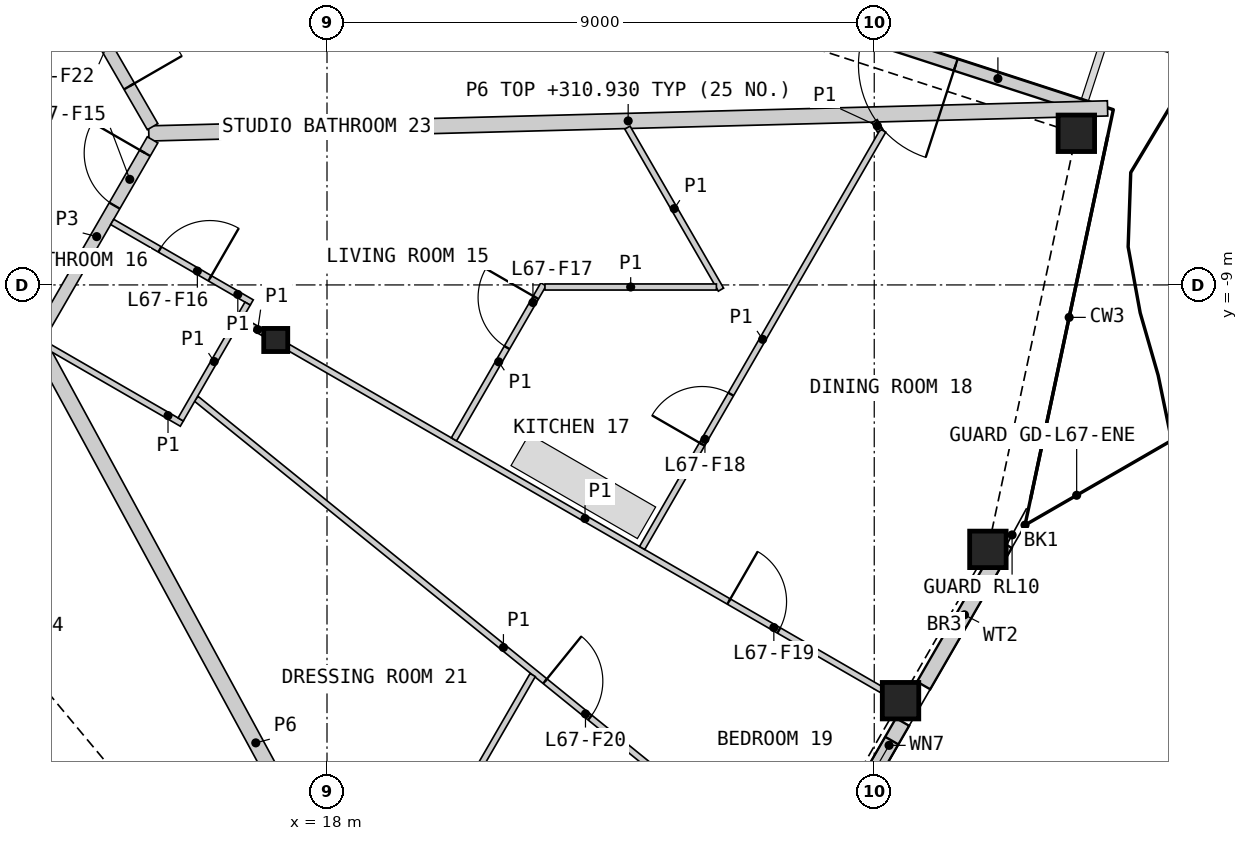
"""IFC4 building model, lengths in metres.
Left out: names, types, materials, properties, quantities, classifications, styles, units other than length and angle.
Written with IfcOpenShell. Run it as: python <this file> out.ifc"""

import sys

from ifc_helpers import new_model, si_unit, direction, frame, frame_2d, origin, origin_2d, place, context, subcontext, project, spatial, rectangle, hollow_rectangle, i_section, extrude, element, fill, save


model = new_model("IFC4")
c1 = context("Model", 3, precision=1e-05, world=origin(), true_north=direction((0.0, 1.0)))
c2 = subcontext(c1, "Body", "Model", "MODEL_VIEW")
j1 = project(units=[si_unit("LENGTHUNIT", "METRE"), si_unit("PLANEANGLEUNIT", "RADIAN")], contexts=[c1])
p1 = place(None, origin())
s1 = spatial("IfcSite", under=j1, at=p1, CompositionType="ELEMENT")
p2 = place(p1, origin())
s2 = spatial("IfcBuilding", under=s1, at=p2, CompositionType="ELEMENT")
p3 = place(p2, frame((0.0, 0.0, 308.6)))
s3 = spatial("IfcBuildingStorey", under=s2, at=p3, CompositionType="ELEMENT", Elevation=308.6)
for number, where, z_axis, x_axis in (
    (1, (27.432, -15.838, 0.0), (0.0, 0.0, 1.0), (1.0, 0.0, 0.0)),
    (2, (28.869, -13.349, 0.0), (0.0, 0.0, 1.0), (1.0, 0.0, 0.0)),
    (3, (30.324, -6.506, 0.0), (0.0, 0.0, 1.0), (1.0, 0.0, 0.0)),
):
    element("IfcColumn", number, at=place(p3, frame(where, z_axis=z_axis, x_axis=x_axis)), inside=s3, PredefinedType="COLUMN", context=c2, shape_type="SweptSolid", body=[
        extrude(hollow_rectangle(XDim=0.6, YDim=0.6, WallThickness=0.04, at=origin_2d()), origin(), (0.0, 0.0, 1.0), 3.4),
    ])
p4 = place(p3, frame((17.157, -9.906, 0.0), z_axis=(0.0, 0.0, 1.0), x_axis=(1.0, 0.0, 0.0)))
e4 = element("IfcColumn", 4, at=p4, inside=s3, PredefinedType="COLUMN", context=c2, shape_type="SweptSolid", body=[
    extrude(i_section(OverallWidth=0.396, OverallDepth=0.381, WebThickness=0.019, FlangeThickness=0.03, at=origin_2d()), origin(), (0.0, 0.0, 1.0), 3.4),
])
p5 = place(p3, frame((26.063, -18.617, 0.0), z_axis=(0.0, 0.0, 1.0), x_axis=(0.499968627931, 0.866043515699, 0.0)))
e5 = element("IfcWall", 5, at=p5, inside=s3, PredefinedType="SOLIDWALL", context=c2, shape_type="SweptSolid", body=[
    extrude(rectangle(XDim=2.804, YDim=0.25, at=frame_2d((1.402, 0.0))), origin(), (0.0, 0.0, 1.0), 2.488),
])
p6 = place(p5, frame((1.55, 0.0, 1.6)))
e6 = element("IfcOpeningElement", 6, at=p6, cuts=e5, PredefinedType="OPENING", context=c2, shape_type="SweptSolid", body=[
    extrude(rectangle(XDim=0.9, YDim=0.6, at=frame_2d((0.45, 0.3))), frame((0.0, 0.135, 0.0), z_axis=(0.0, -1.0, 0.0), x_axis=(1.0, 0.0, 0.0)), (0.0, 0.0, 1.0), 0.27),
])
p7 = place(p3, frame((27.812, -15.588, 0.0), z_axis=(0.0, 0.0, 1.0), x_axis=(0.500032109083, 0.866006864803, 0.0)))
e7 = element("IfcWall", 7, at=p7, inside=s3, PredefinedType="SOLIDWALL", context=c2, shape_type="SweptSolid", body=[
    extrude(rectangle(XDim=2.684, YDim=0.25, at=frame_2d((1.342, 0.0))), origin(), (0.0, 0.0, 1.0), 2.488),
])
p8 = place(p3, frame((30.488, -6.078, 0.0), z_axis=(0.0, 0.0, 1.0), x_axis=(-0.951062515241, 0.308998530908, 0.0)))
e8 = element("IfcWall", 8, at=p8, inside=s3, PredefinedType="SOLIDWALL", context=c2, shape_type="SweptSolid", body=[
    extrude(rectangle(XDim=6.117, YDim=0.2, at=frame_2d((3.059, 0.0))), origin(), (0.0, 0.0, 1.0), 2.488),
])
p9 = place(p8, frame((2.259, 0.0, 0.0)))
e9 = element("IfcOpeningElement", 9, at=p9, cuts=e8, PredefinedType="OPENING", context=c2, shape_type="SweptSolid", body=[
    extrude(rectangle(XDim=1.6, YDim=2.25, at=frame_2d((0.8, 1.125))), frame((0.0, 0.11, 0.0), z_axis=(0.0, -1.0, 0.0), x_axis=(1.0, 0.0, 0.0)), (0.0, 0.0, 1.0), 0.22),
])
p10 = place(p3, frame((15.069, -6.509, 0.0), z_axis=(0.0, 0.0, 1.0), x_axis=(0.999657828615, 0.026157708023, 0.0)))
e10 = element("IfcWall", 10, at=p10, inside=s3, PredefinedType="PARTITIONING", context=c2, shape_type="SweptSolid", body=[
    extrude(rectangle(XDim=15.773, YDim=0.25, at=frame_2d((7.887, 0.0))), origin(), (0.0, 0.0, 1.0), 2.33),
])
p11 = place(p3, frame((13.171, -9.796, 0.0), z_axis=(0.0, 0.0, 1.0), x_axis=(0.477178668135, -0.878806303275, 0.0)))
e11 = element("IfcWall", 11, at=p11, inside=s3, PredefinedType="PARTITIONING", context=c2, shape_type="SweptSolid", body=[
    extrude(rectangle(XDim=15.33, YDim=0.25, at=frame_2d((7.665, 0.0))), origin(), (0.0, 0.0, 1.0), 2.33),
])
p12 = place(p3, frame((12.988, -2.684, 0.0), z_axis=(0.0, 0.0, 1.0), x_axis=(0.500003406062, -0.866023437285, 0.0)))
e12 = element("IfcWall", 12, at=p12, inside=s3, PredefinedType="PARTITIONING", context=c2, shape_type="SweptSolid", body=[
    extrude(rectangle(XDim=4.288, YDim=0.2, at=frame_2d((2.144, 0.0))), origin(), (0.0, 0.0, 1.0), 3.1),
])
p13 = place(p12, frame((2.521, 0.0, 0.0)))
e13 = element("IfcOpeningElement", 13, at=p13, cuts=e12, PredefinedType="OPENING", context=c2, shape_type="SweptSolid", body=[
    extrude(rectangle(XDim=1.0, YDim=2.1, at=frame_2d((0.5, 1.05))), frame((0.0, 0.11, 0.0), z_axis=(0.0, -1.0, 0.0), x_axis=(1.0, 0.0, 0.0)), (0.0, 0.0, 1.0), 0.22),
])
p14 = place(p3, frame((13.293, -9.797, 0.0), z_axis=(0.0, 0.0, 1.0), x_axis=(0.499967746641, 0.866044024469, 0.0)))
e14 = element("IfcWall", 14, at=p14, inside=s3, PredefinedType="PARTITIONING", context=c2, shape_type="SweptSolid", body=[
    extrude(rectangle(XDim=3.676, YDim=0.2, at=frame_2d((1.838, 0.0))), origin(), (0.0, 0.0, 1.0), 3.1),
])
p15 = place(p14, frame((2.426, 0.0, 0.0)))
e15 = element("IfcOpeningElement", 15, at=p15, cuts=e14, PredefinedType="OPENING", context=c2, shape_type="SweptSolid", body=[
    extrude(rectangle(XDim=1.0, YDim=2.1, at=frame_2d((0.5, 1.05))), frame((0.0, 0.11, 0.0), z_axis=(0.0, -1.0, 0.0), x_axis=(1.0, 0.0, 0.0)), (0.0, 0.0, 1.0), 0.22),
])
p16 = place(p3, frame((15.848, -10.871, 0.0), z_axis=(0.0, 0.0, 1.0), x_axis=(0.77713687197, -0.629331615465, 0.0)))
e16 = element("IfcWall", 16, at=p16, inside=s3, PredefinedType="PARTITIONING", context=c2, shape_type="SweptSolid", body=[
    extrude(rectangle(XDim=13.004, YDim=0.1, at=frame_2d((6.502, 0.0))), origin(), (0.0, 0.0, 1.0), 2.33),
])
p17 = place(p16, frame((7.384, 0.0, 0.0)))
e17 = element("IfcOpeningElement", 17, at=p17, cuts=e16, PredefinedType="OPENING", context=c2, shape_type="SweptSolid", body=[
    extrude(rectangle(XDim=0.95, YDim=2.1, at=frame_2d((0.475, 1.05))), frame((0.0, 0.06, 0.0), z_axis=(0.0, -1.0, 0.0), x_axis=(1.0, 0.0, 0.0)), (0.0, 0.0, 1.0), 0.12),
])
p18 = place(p3, frame((17.365, -10.025, 0.0), z_axis=(0.0, 0.0, 1.0), x_axis=(0.866021046153, -0.500007547564, 0.0)))
e18 = element("IfcWall", 18, at=p18, inside=s3, PredefinedType="PARTITIONING", context=c2, shape_type="SweptSolid", body=[
    extrude(rectangle(XDim=11.267, YDim=0.1, at=frame_2d((5.634, 0.0))), origin(), (0.0, 0.0, 1.0), 2.33),
])
p19 = place(p18, frame((8.364, 0.0, 0.0)))
e19 = element("IfcOpeningElement", 19, at=p19, cuts=e18, PredefinedType="OPENING", context=c2, shape_type="SweptSolid", body=[
    extrude(rectangle(XDim=0.95, YDim=2.1, at=frame_2d((0.475, 1.05))), frame((0.0, 0.06, 0.0), z_axis=(0.0, -1.0, 0.0), x_axis=(1.0, 0.0, 0.0)), (0.0, 0.0, 1.0), 0.12),
])
p20 = place(p3, frame((23.183, -13.327, 0.0), z_axis=(0.0, 0.0, 1.0), x_axis=(0.499991741039, 0.866030172045, 0.0)))
e20 = element("IfcWall", 20, at=p20, inside=s3, PredefinedType="PARTITIONING", context=c2, shape_type="SweptSolid", body=[
    extrude(rectangle(XDim=7.927, YDim=0.1, at=frame_2d((3.963, 0.0))), origin(), (0.0, 0.0, 1.0), 2.33),
])
p21 = place(p20, frame((1.97, 0.0, 0.0)))
e21 = element("IfcOpeningElement", 21, at=p21, cuts=e20, PredefinedType="OPENING", context=c2, shape_type="SweptSolid", body=[
    extrude(rectangle(XDim=0.95, YDim=2.1, at=frame_2d((0.475, 1.05))), frame((0.0, 0.06, 0.0), z_axis=(0.0, -1.0, 0.0), x_axis=(1.0, 0.0, 0.0)), (0.0, 0.0, 1.0), 0.12),
])
p22 = place(p3, frame((18.873, -19.764, 0.0), z_axis=(0.0, 0.0, 1.0), x_axis=(0.499983455602, 0.866034955486, 0.0)))
e22 = element("IfcWall", 22, at=p22, inside=s3, PredefinedType="PARTITIONING", context=c2, shape_type="SweptSolid", body=[
    extrude(rectangle(XDim=5.02, YDim=0.1, at=frame_2d((2.51, 0.0))), origin(), (0.0, 0.0, 1.0), 2.33),
])
p23 = place(p22, frame((1.576, 0.0, 0.0)))
e23 = element("IfcOpeningElement", 23, at=p23, cuts=e22, PredefinedType="OPENING", context=c2, shape_type="SweptSolid", body=[
    extrude(rectangle(XDim=0.95, YDim=2.1, at=frame_2d((0.475, 1.05))), frame((0.0, 0.06, 0.0), z_axis=(0.0, -1.0, 0.0), x_axis=(1.0, 0.0, 0.0)), (0.0, 0.0, 1.0), 0.12),
])
p24 = place(p3, frame((22.941, -6.413, 0.0), z_axis=(0.0, 0.0, 1.0), x_axis=(0.500013199183, -0.866017783098, 0.0)))
e24 = element("IfcWall", 24, at=p24, inside=s3, PredefinedType="PARTITIONING", context=c2, shape_type="SweptSolid", body=[
    extrude(rectangle(XDim=3.077, YDim=0.1, at=frame_2d((1.539, 0.0))), origin(), (0.0, 0.0, 1.0), 2.33),
])
p25 = place(p3, frame((20.088, -11.54, 0.0), z_axis=(0.0, 0.0, 1.0), x_axis=(0.500055103712, 0.865993587304, 0.0)))
e25 = element("IfcWall", 25, at=p25, inside=s3, PredefinedType="PARTITIONING", context=c2, shape_type="SweptSolid", body=[
    extrude(rectangle(XDim=2.944, YDim=0.1, at=frame_2d((1.472, 0.0))), origin(), (0.0, 0.0, 1.0), 2.33),
])
p26 = place(p25, frame((1.744, 0.0, 0.0)))
e26 = element("IfcOpeningElement", 26, at=p26, cuts=e25, PredefinedType="OPENING", context=c2, shape_type="SweptSolid", body=[
    extrude(rectangle(XDim=0.95, YDim=2.1, at=frame_2d((0.475, 1.05))), frame((0.0, 0.06, 0.0), z_axis=(0.0, -1.0, 0.0), x_axis=(1.0, 0.0, 0.0)), (0.0, 0.0, 1.0), 0.12),
])
p27 = place(p3, frame((21.584, -9.034, 0.0), z_axis=(0.0, 0.0, 1.0), x_axis=(1.0, 0.0, 0.0)))
e27 = element("IfcWall", 27, at=p27, inside=s3, PredefinedType="PARTITIONING", context=c2, shape_type="SweptSolid", body=[
    extrude(rectangle(XDim=2.82, YDim=0.1, at=frame_2d((1.41, 0.0))), origin(), (0.0, 0.0, 1.0), 2.33),
])
p28 = place(p3, frame((14.468, -7.964, 0.0), z_axis=(0.0, 0.0, 1.0), x_axis=(0.865989200783, -0.500062700197, 0.0)))
e28 = element("IfcWall", 28, at=p28, inside=s3, PredefinedType="PARTITIONING", context=c2, shape_type="SweptSolid", body=[
    extrude(rectangle(XDim=2.65, YDim=0.1, at=frame_2d((1.325, 0.0))), origin(), (0.0, 0.0, 1.0), 2.33),
])
p29 = place(p28, frame((0.905, 0.0, 0.0)))
e29 = element("IfcOpeningElement", 29, at=p29, cuts=e28, PredefinedType="OPENING", context=c2, shape_type="SweptSolid", body=[
    extrude(rectangle(XDim=0.95, YDim=2.1, at=frame_2d((0.475, 1.05))), frame((0.0, 0.06, 0.0), z_axis=(0.0, -1.0, 0.0), x_axis=(1.0, 0.0, 0.0)), (0.0, 0.0, 1.0), 0.12),
])
p30 = place(p3, frame((13.339, -9.968, 0.0), z_axis=(0.0, 0.0, 1.0), x_axis=(0.866036909293, -0.499980071345, 0.0)))
e30 = element("IfcWall", 30, at=p30, inside=s3, PredefinedType="PARTITIONING", context=c2, shape_type="SweptSolid", body=[
    extrude(rectangle(XDim=2.625, YDim=0.1, at=frame_2d((1.312, 0.0))), origin(), (0.0, 0.0, 1.0), 2.33),
])
p31 = place(p3, frame((15.594, -11.212, 0.0), z_axis=(0.0, 0.0, 1.0), x_axis=(0.499898558967, 0.866083962871, 0.0)))
e31 = element("IfcWall", 31, at=p31, inside=s3, PredefinedType="PARTITIONING", context=c2, shape_type="SweptSolid", body=[
    extrude(rectangle(XDim=2.2, YDim=0.1, at=frame_2d((1.1, 0.0))), origin(), (0.0, 0.0, 1.0), 2.33),
])
p32 = place(p3, frame((16.594, -9.581, 0.0), z_axis=(0.0, 0.0, 1.0), x_axis=(0.866036909293, -0.499980071345, 0.0)))
e32 = element("IfcWall", 32, at=p32, inside=s3, PredefinedType="PARTITIONING", context=c2, shape_type="SweptSolid", body=[
    extrude(rectangle(XDim=0.41, YDim=0.1, at=frame_2d((0.205, 0.0))), origin(), (0.0, 0.0, 1.0), 2.33),
])
p33 = place(p3, frame((27.006, -6.306, 0.0), z_axis=(0.0, 0.0, 1.0), x_axis=(0.500074377092, -0.865982457891, 0.0)))
e33 = element("IfcWall", 33, at=p33, inside=s3, PredefinedType="PARTITIONING", context=c2, shape_type="SweptSolid", body=[
    extrude(rectangle(XDim=0.18, YDim=0.1, at=frame_2d((0.09, 0.0))), origin(), (0.0, 0.0, 1.0), 2.33),
])
p34 = place(p6, origin())
e34 = element("IfcWindow", 34, at=p34, inside=s3, PartitioningType="SINGLE_PANEL", PredefinedType="WINDOW", context=c2, shape_type="SweptSolid", body=[
    extrude(rectangle(XDim=0.9, YDim=0.6, at=frame_2d((0.45, 0.3))), frame((0.0, 0.03, 0.0), z_axis=(0.0, -1.0, 0.0), x_axis=(1.0, 0.0, 0.0)), (0.0, 0.0, 1.0), 0.06),
])
fill(e6, e34)
p35 = place(p9, origin())
e35 = element("IfcDoor", 35, at=p35, inside=s3, OperationType="DOUBLE_DOOR_SINGLE_SWING", PredefinedType="DOOR", context=c2, shape_type="SweptSolid", body=[
    extrude(rectangle(XDim=1.6, YDim=2.25, at=frame_2d((0.8, 1.125))), frame((0.0, 0.025, 0.0), z_axis=(0.0, -1.0, 0.0), x_axis=(1.0, 0.0, 0.0)), (0.0, 0.0, 1.0), 0.05),
])
fill(e9, e35)
p36 = place(p15, origin())
e36 = element("IfcDoor", 36, at=p36, inside=s3, OperationType="SINGLE_SWING_RIGHT", PredefinedType="DOOR", context=c2, shape_type="SweptSolid", body=[
    extrude(rectangle(XDim=1.0, YDim=2.1, at=frame_2d((0.5, 1.05))), frame((0.0, 0.025, 0.0), z_axis=(0.0, -1.0, 0.0), x_axis=(1.0, 0.0, 0.0)), (0.0, 0.0, 1.0), 0.05),
])
fill(e15, e36)
p37 = place(p29, origin())
e37 = element("IfcDoor", 37, at=p37, inside=s3, OperationType="SINGLE_SWING_RIGHT", PredefinedType="DOOR", context=c2, shape_type="SweptSolid", body=[
    extrude(rectangle(XDim=0.95, YDim=2.1, at=frame_2d((0.475, 1.05))), frame((0.0, 0.025, 0.0), z_axis=(0.0, -1.0, 0.0), x_axis=(1.0, 0.0, 0.0)), (0.0, 0.0, 1.0), 0.05),
])
fill(e29, e37)
p38 = place(p26, origin())
e38 = element("IfcDoor", 38, at=p38, inside=s3, OperationType="SINGLE_SWING_RIGHT", PredefinedType="DOOR", context=c2, shape_type="SweptSolid", body=[
    extrude(rectangle(XDim=0.95, YDim=2.1, at=frame_2d((0.475, 1.05))), frame((0.0, 0.025, 0.0), z_axis=(0.0, -1.0, 0.0), x_axis=(1.0, 0.0, 0.0)), (0.0, 0.0, 1.0), 0.05),
])
fill(e26, e38)
p39 = place(p21, origin())
e39 = element("IfcDoor", 39, at=p39, inside=s3, OperationType="SINGLE_SWING_LEFT", PredefinedType="DOOR", context=c2, shape_type="SweptSolid", body=[
    extrude(rectangle(XDim=0.95, YDim=2.1, at=frame_2d((0.475, 1.05))), frame((0.0, 0.025, 0.0), z_axis=(0.0, -1.0, 0.0), x_axis=(1.0, 0.0, 0.0)), (0.0, 0.0, 1.0), 0.05),
])
fill(e21, e39)
p40 = place(p19, origin())
e40 = element("IfcDoor", 40, at=p40, inside=s3, OperationType="SINGLE_SWING_LEFT", PredefinedType="DOOR", context=c2, shape_type="SweptSolid", body=[
    extrude(rectangle(XDim=0.95, YDim=2.1, at=frame_2d((0.475, 1.05))), frame((0.0, 0.025, 0.0), z_axis=(0.0, -1.0, 0.0), x_axis=(1.0, 0.0, 0.0)), (0.0, 0.0, 1.0), 0.05),
])
fill(e19, e40)
p41 = place(p17, origin())
e41 = element("IfcDoor", 41, at=p41, inside=s3, OperationType="SINGLE_SWING_LEFT", PredefinedType="DOOR", context=c2, shape_type="SweptSolid", body=[
    extrude(rectangle(XDim=0.95, YDim=2.1, at=frame_2d((0.475, 1.05))), frame((0.0, 0.025, 0.0), z_axis=(0.0, -1.0, 0.0), x_axis=(1.0, 0.0, 0.0)), (0.0, 0.0, 1.0), 0.05),
])
fill(e17, e41)
p42 = place(p13, origin())
e42 = element("IfcDoor", 42, at=p42, inside=s3, OperationType="SINGLE_SWING_RIGHT", PredefinedType="DOOR", context=c2, shape_type="SweptSolid", body=[
    extrude(rectangle(XDim=1.0, YDim=2.1, at=frame_2d((0.5, 1.05))), frame((0.0, 0.025, 0.0), z_axis=(0.0, -1.0, 0.0), x_axis=(1.0, 0.0, 0.0)), (0.0, 0.0, 1.0), 0.05),
])
fill(e13, e42)
save(model, sys.argv[1])
